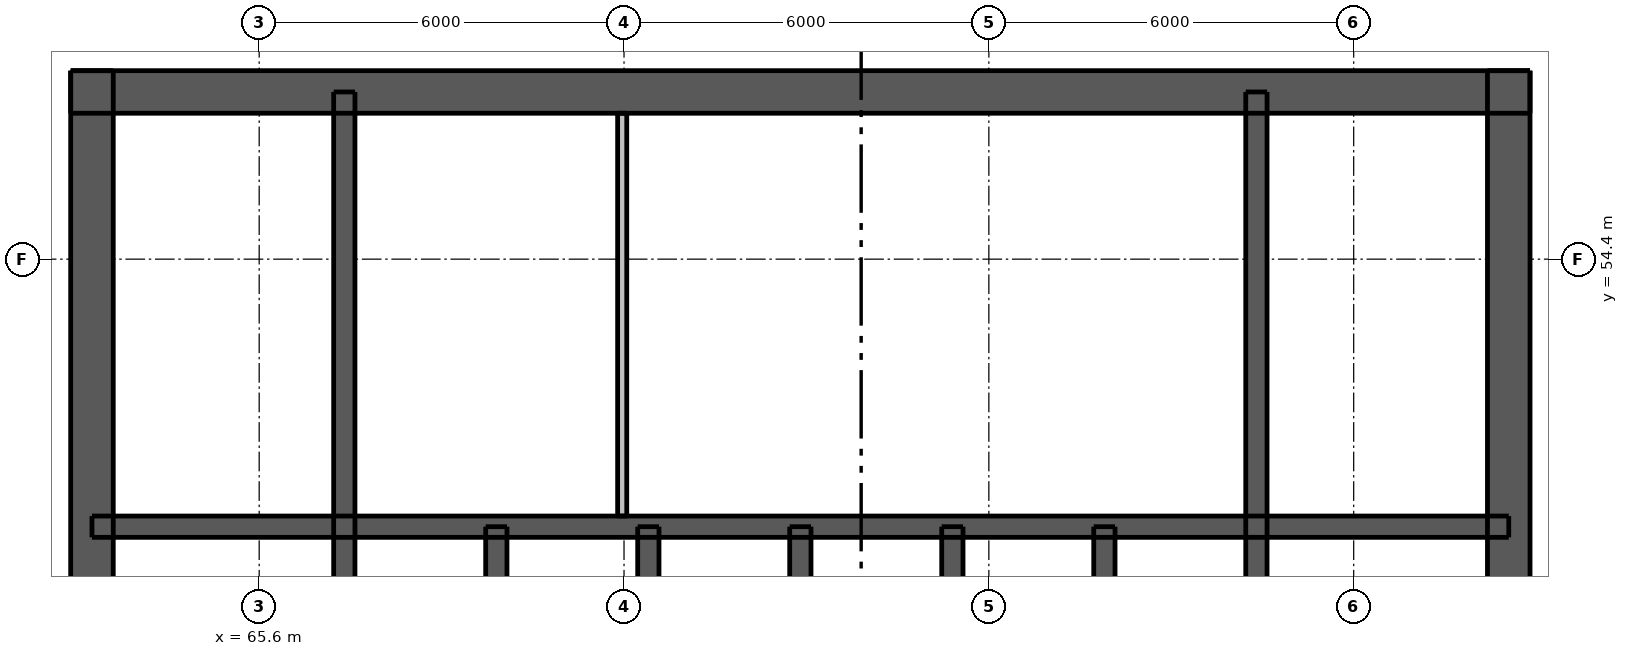
"""IFC4 building model, lengths in metres.
Left out: names, types, materials, properties, quantities, classifications, styles, units other than length and angle.
Written with IfcOpenShell. Run it as: python <this file> out.ifc"""

import sys

from ifc_helpers import new_model, si_unit, direction, frame, frame_2d, origin, place, context, subcontext, project, spatial, rectangle, extrude, element, fill, save


model = new_model("IFC4")
c1 = context("Model", 3, precision=1e-05, world=origin(), true_north=direction((0.0, 1.0)))
c2 = subcontext(c1, "Body", "Model", "MODEL_VIEW")
j1 = project(units=[si_unit("LENGTHUNIT", "METRE"), si_unit("PLANEANGLEUNIT", "RADIAN")], contexts=[c1])
p1 = place(None, origin())
s1 = spatial("IfcSite", under=j1, at=p1, CompositionType="ELEMENT")
p2 = place(p1, origin())
s2 = spatial("IfcBuilding", under=s1, at=p2, CompositionType="ELEMENT")
p3 = place(p2, frame((0.0, 0.0, 164.8)))
s3 = spatial("IfcBuildingStorey", under=s2, at=p3, CompositionType="ELEMENT", Elevation=164.8)
p4 = place(p3, frame((62.5, 57.15, 0.0), z_axis=(0.0, 0.0, 1.0), x_axis=(1.0, 0.0, 0.0)))
e1 = element("IfcWall", 1, at=p4, inside=s3, PredefinedType="SHEAR", context=c2, shape_type="SweptSolid", body=[
    extrude(rectangle(XDim=24.0, YDim=0.7, at=frame_2d((12.0, 0.0))), origin(), (0.0, 0.0, 1.0), 3.05),
])
p5 = place(p4, frame((20.938, 0.0, 0.0)))
e2 = element("IfcOpeningElement", 2, at=p5, cuts=e1, PredefinedType="OPENING", context=c2, shape_type="SweptSolid", body=[
    extrude(rectangle(XDim=1.1, YDim=2.1, at=frame_2d((0.55, 1.05))), frame((0.0, 0.36, 0.0), z_axis=(0.0, -1.0, 0.0), x_axis=(1.0, 0.0, 0.0)), (0.0, 0.0, 1.0), 0.72),
])
p6 = place(p4, frame((1.962, 0.0, 0.0)))
e3 = element("IfcOpeningElement", 3, at=p6, cuts=e1, PredefinedType="OPENING", context=c2, shape_type="SweptSolid", body=[
    extrude(rectangle(XDim=1.1, YDim=2.1, at=frame_2d((0.55, 1.05))), frame((0.0, 0.36, 0.0), z_axis=(0.0, -1.0, 0.0), x_axis=(1.0, 0.0, 0.0)), (0.0, 0.0, 1.0), 0.72),
])
p7 = place(p4, frame((6.423, 0.0, 0.0)))
e4 = element("IfcOpeningElement", 4, at=p7, cuts=e1, PredefinedType="OPENING", context=c2, shape_type="SweptSolid", body=[
    extrude(rectangle(XDim=0.9, YDim=2.1, at=frame_2d((0.45, 1.05))), frame((0.0, 0.36, 0.0), z_axis=(0.0, -1.0, 0.0), x_axis=(1.0, 0.0, 0.0)), (0.0, 0.0, 1.0), 0.72),
])
p8 = place(p4, frame((13.748, 0.0, 0.0)))
e5 = element("IfcOpeningElement", 5, at=p8, cuts=e1, PredefinedType="OPENING", context=c2, shape_type="SweptSolid", body=[
    extrude(rectangle(XDim=0.9, YDim=2.1, at=frame_2d((0.45, 1.05))), frame((0.0, 0.36, 0.0), z_axis=(0.0, -1.0, 0.0), x_axis=(1.0, 0.0, 0.0)), (0.0, 0.0, 1.0), 0.72),
])
p9 = place(p3, frame((62.85, 33.5, 0.0), z_axis=(0.0, 0.0, 1.0), x_axis=(0.0, 1.0, 0.0)))
e6 = element("IfcWall", 6, at=p9, inside=s3, PredefinedType="SHEAR", context=c2, shape_type="SweptSolid", body=[
    extrude(rectangle(XDim=24.0, YDim=0.7, at=frame_2d((12.0, 0.0))), origin(), (0.0, 0.0, 1.0), 3.05),
])
p10 = place(p9, frame((11.2, 0.0, 0.0)))
e7 = element("IfcOpeningElement", 7, at=p10, cuts=e6, PredefinedType="OPENING", context=c2, shape_type="SweptSolid", body=[
    extrude(rectangle(XDim=1.6, YDim=2.1, at=frame_2d((0.8, 1.05))), frame((0.0, 0.36, 0.0), z_axis=(0.0, -1.0, 0.0), x_axis=(1.0, 0.0, 0.0)), (0.0, 0.0, 1.0), 0.72),
])
p11 = place(p3, frame((86.15, 33.5, 0.0), z_axis=(0.0, 0.0, 1.0), x_axis=(0.0, 1.0, 0.0)))
e8 = element("IfcWall", 8, at=p11, inside=s3, PredefinedType="SHEAR", context=c2, shape_type="SweptSolid", body=[
    extrude(rectangle(XDim=24.0, YDim=0.7, at=frame_2d((12.0, 0.0))), origin(), (0.0, 0.0, 1.0), 3.05),
])
p12 = place(p11, frame((11.2, 0.0, 0.0)))
e9 = element("IfcOpeningElement", 9, at=p12, cuts=e8, PredefinedType="OPENING", context=c2, shape_type="SweptSolid", body=[
    extrude(rectangle(XDim=1.6, YDim=2.1, at=frame_2d((0.8, 1.05))), frame((0.0, 0.36, 0.0), z_axis=(0.0, -1.0, 0.0), x_axis=(1.0, 0.0, 0.0)), (0.0, 0.0, 1.0), 0.72),
])
p13 = place(p3, frame((62.85, 50.0, 0.0), z_axis=(0.0, 0.0, 1.0), x_axis=(1.0, 0.0, 0.0)))
e10 = element("IfcWall", 10, at=p13, inside=s3, PredefinedType="SHEAR", context=c2, shape_type="SweptSolid", body=[
    extrude(rectangle(XDim=23.3, YDim=0.35, at=frame_2d((11.65, 0.0))), origin(), (0.0, 0.0, 1.0), 3.05),
])
for number, where, z_axis, x_axis in (
    (11, (67.0, 47.1, 0.0), (0.0, 0.0, 1.0), (0.0, 1.0, 0.0)),
    (12, (82.0, 47.1, 0.0), (0.0, 0.0, 1.0), (0.0, 1.0, 0.0)),
):
    element("IfcWall", number, at=place(p3, frame(where, z_axis=z_axis, x_axis=x_axis)), inside=s3, PredefinedType="SHEAR", context=c2, shape_type="SweptSolid", body=[
        extrude(rectangle(XDim=10.05, YDim=0.35, at=frame_2d((5.025, 0.0))), origin(), (0.0, 0.0, 1.0), 3.05),
    ])
for number, where, z_axis, x_axis in (
    (13, (69.5, 47.1, 0.0), (0.0, 0.0, 1.0), (0.0, 1.0, 0.0)),
    (14, (72.0, 47.1, 0.0), (0.0, 0.0, 1.0), (0.0, 1.0, 0.0)),
    (15, (74.5, 47.1, 0.0), (0.0, 0.0, 1.0), (0.0, 1.0, 0.0)),
    (16, (77.0, 47.1, 0.0), (0.0, 0.0, 1.0), (0.0, 1.0, 0.0)),
    (17, (79.5, 47.1, 0.0), (0.0, 0.0, 1.0), (0.0, 1.0, 0.0)),
):
    element("IfcWall", number, at=place(p3, frame(where, z_axis=z_axis, x_axis=x_axis)), inside=s3, PredefinedType="SHEAR", context=c2, shape_type="SweptSolid", body=[
        extrude(rectangle(XDim=2.9, YDim=0.35, at=frame_2d((1.45, 0.0))), origin(), (0.0, 0.0, 1.0), 3.05),
    ])
p14 = place(p3, frame((71.57, 50.175, 0.0), z_axis=(0.0, 0.0, 1.0), x_axis=(0.0, 1.0, 0.0)))
e18 = element("IfcWall", 18, at=p14, inside=s3, PredefinedType="PLUMBINGWALL", context=c2, shape_type="SweptSolid", body=[
    extrude(rectangle(XDim=6.625, YDim=0.15, at=frame_2d((3.312, 0.0))), origin(), (0.0, 0.0, 1.0), 3.05),
])
p15 = place(p5, origin())
e19 = element("IfcDoor", 19, at=p15, inside=s3, OperationType="SINGLE_SWING_RIGHT", PredefinedType="DOOR", context=c2, shape_type="SweptSolid", body=[
    extrude(rectangle(XDim=1.1, YDim=2.1, at=frame_2d((0.55, 1.05))), frame((0.0, -0.288, 0.0), z_axis=(0.0, -1.0, 0.0), x_axis=(1.0, 0.0, 0.0)), (0.0, 0.0, 1.0), 0.05),
])
fill(e2, e19)
p16 = place(p6, origin())
e20 = element("IfcDoor", 20, at=p16, inside=s3, OperationType="SINGLE_SWING_LEFT", PredefinedType="DOOR", context=c2, shape_type="SweptSolid", body=[
    extrude(rectangle(XDim=1.1, YDim=2.1, at=frame_2d((0.55, 1.05))), frame((0.0, -0.288, 0.0), z_axis=(0.0, -1.0, 0.0), x_axis=(1.0, 0.0, 0.0)), (0.0, 0.0, 1.0), 0.05),
])
fill(e3, e20)
p17 = place(p7, origin())
e21 = element("IfcDoor", 21, at=p17, inside=s3, OperationType="SINGLE_SWING_RIGHT", PredefinedType="DOOR", context=c2, shape_type="SweptSolid", body=[
    extrude(rectangle(XDim=0.9, YDim=2.1, at=frame_2d((0.45, 1.05))), frame((0.0, -0.288, 0.0), z_axis=(0.0, -1.0, 0.0), x_axis=(1.0, 0.0, 0.0)), (0.0, 0.0, 1.0), 0.05),
])
fill(e4, e21)
p18 = place(p8, origin())
e22 = element("IfcDoor", 22, at=p18, inside=s3, OperationType="SINGLE_SWING_RIGHT", PredefinedType="DOOR", context=c2, shape_type="SweptSolid", body=[
    extrude(rectangle(XDim=0.9, YDim=2.1, at=frame_2d((0.45, 1.05))), frame((0.0, -0.288, 0.0), z_axis=(0.0, -1.0, 0.0), x_axis=(1.0, 0.0, 0.0)), (0.0, 0.0, 1.0), 0.05),
])
fill(e5, e22)
save(model, sys.argv[1])
